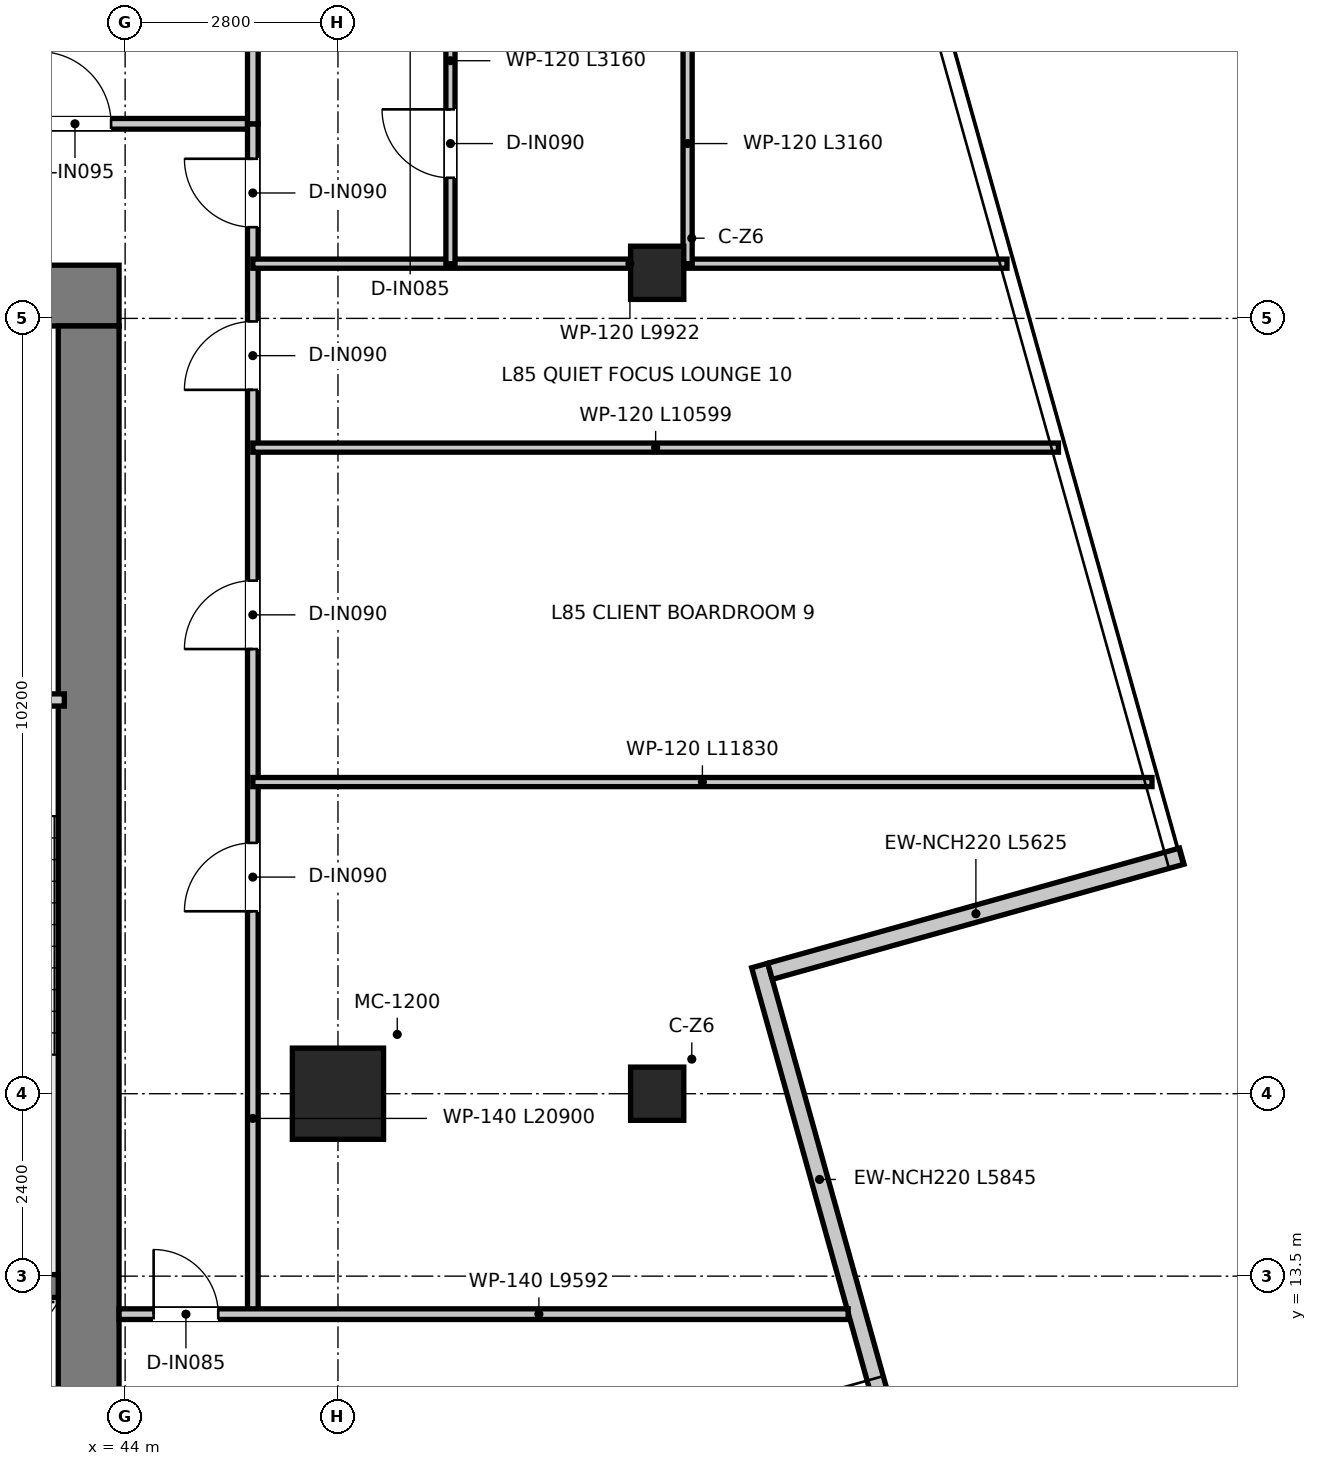
"""IFC4 building model, lengths in metres.
Left out: names, types, materials, properties, quantities, classifications, styles, units other than length and angle.
Written with IfcOpenShell. Run it as: python <this file> out.ifc"""

import sys

from ifc_helpers import new_model, si_unit, direction, frame, frame_2d, origin, origin_2d, place, context, subcontext, project, spatial, rectangle, extrude, source, transform, mapped, element, fill, save


model = new_model("IFC4")
c1 = context("Model", 3, precision=1e-05, world=origin(), true_north=direction((0.0, 1.0)))
c2 = subcontext(c1, "Body", "Model", "MODEL_VIEW")
j1 = project(units=[si_unit("LENGTHUNIT", "METRE"), si_unit("PLANEANGLEUNIT", "RADIAN")], contexts=[c1])
p1 = place(None, origin())
s1 = spatial("IfcSite", under=j1, at=p1, CompositionType="ELEMENT")
p2 = place(p1, origin())
s2 = spatial("IfcBuilding", under=s1, at=p2, CompositionType="ELEMENT")
p3 = place(p2, frame((0.0, 0.0, 347.45)))
s3 = spatial("IfcBuildingStorey", under=s2, at=p3, CompositionType="ELEMENT", Elevation=347.45)
p4 = place(p3, frame((28.08, 26.4, 0.0), z_axis=(0.0, 0.0, 1.0), x_axis=(1.0, 0.0, 0.0)))
e1 = element("IfcWall", 1, at=p4, inside=s3, PredefinedType="SHEAR", context=c2, shape_type="SweptSolid", body=[
    extrude(rectangle(XDim=15.84, YDim=0.8, at=frame_2d((7.92, 0.0))), origin(), (0.0, 0.0, 1.0), 3.95),
])
p5 = place(p4, frame((7.22, 0.0, 0.0)))
e2 = element("IfcOpeningElement", 2, at=p5, cuts=e1, PredefinedType="OPENING", context=c2, shape_type="SweptSolid", body=[
    extrude(rectangle(XDim=1.4, YDim=2.2, at=frame_2d((0.7, 1.1))), frame((0.0, 0.41, 0.0), z_axis=(0.0, -1.0, 0.0), x_axis=(1.0, 0.0, 0.0)), (0.0, 0.0, 1.0), 0.82),
])
p6 = place(p4, frame((1.775, 0.0, 0.0)))
e3 = element("IfcOpeningElement", 3, at=p6, cuts=e1, PredefinedType="OPENING", context=c2, shape_type="SweptSolid", body=[
    extrude(rectangle(XDim=1.05, YDim=2.1, at=frame_2d((0.525, 1.05))), frame((0.0, 0.41, 0.0), z_axis=(0.0, -1.0, 0.0), x_axis=(1.0, 0.0, 0.0)), (0.0, 0.0, 1.0), 0.82),
])
p7 = place(p4, frame((13.015, 0.0, 0.0)))
e4 = element("IfcOpeningElement", 4, at=p7, cuts=e1, PredefinedType="OPENING", context=c2, shape_type="SweptSolid", body=[
    extrude(rectangle(XDim=1.05, YDim=2.1, at=frame_2d((0.525, 1.05))), frame((0.0, 0.41, 0.0), z_axis=(0.0, -1.0, 0.0), x_axis=(1.0, 0.0, 0.0)), (0.0, 0.0, 1.0), 0.82),
])
p8 = place(p3, frame((43.52, 11.3, 0.0), z_axis=(0.0, 0.0, 1.0), x_axis=(0.0, 1.0, 0.0)))
e5 = element("IfcWall", 5, at=p8, inside=s3, PredefinedType="SHEAR", context=c2, shape_type="SweptSolid", body=[
    extrude(rectangle(XDim=14.7, YDim=0.8, at=frame_2d((7.35, 0.0))), origin(), (0.0, 0.0, 1.0), 3.95),
])
p9 = place(p3, frame((40.02, 13.37, 0.0), z_axis=(0.0, 0.0, 1.0), x_axis=(1.0, 0.0, 0.0)))
e6 = element("IfcWall", 6, at=p9, inside=s3, PredefinedType="SHEAR", context=c2, shape_type="SweptSolid", body=[
    extrude(rectangle(XDim=3.1, YDim=0.3, at=frame_2d((1.55, 0.0))), origin(), (0.0, 0.0, 1.0), 3.95),
])
m1 = source(origin(), c2, "Body", "SweptSolid", [
    extrude(rectangle(XDim=1.2, YDim=1.2, at=origin_2d()), origin(), (0.0, 0.0, 1.0), 3.95),
])
p10 = place(p3, frame((46.8, 15.9, 0.0), z_axis=(0.0, 0.0, 1.0), x_axis=(1.0, 0.0, 0.0)))
e7 = element("IfcColumn", 7, at=p10, inside=s3, PredefinedType="USERDEFINED", context=c2, shape_type="MappedRepresentation", body=[
    mapped(m1, transform((0.0, 0.0, 0.0), x_axis=(1.0, 0.0, 0.0), y_axis=(0.0, 1.0, 0.0), z_axis=(0.0, 0.0, 1.0), scale=1.0)),
])
m2 = source(origin(), c2, "Body", "SweptSolid", [
    extrude(rectangle(XDim=0.7, YDim=0.7, at=origin_2d()), origin(), (0.0, 0.0, 1.0), 3.95),
])
for number, where, z_axis, x_axis in (
    (8, (51.0, 26.7, 0.0), (0.0, 0.0, 1.0), (1.0, 0.0, 0.0)),
    (9, (51.0, 15.9, 0.0), (0.0, 0.0, 1.0), (1.0, 0.0, 0.0)),
):
    element("IfcColumn", number, at=place(p3, frame(where, z_axis=z_axis, x_axis=x_axis)), inside=s3, PredefinedType="COLUMN", context=c2, shape_type="MappedRepresentation", body=[
        mapped(m2, transform((0.0, 0.0, 0.0), x_axis=(1.0, 0.0, 0.0), y_axis=(0.0, 1.0, 0.0), z_axis=(0.0, 0.0, 1.0), scale=1.0)),
    ])
p11 = place(p3, frame((53.923, 11.958, 0.0), z_axis=(0.0, 0.0, 1.0), x_axis=(-0.26932160756, 0.96305029552, 0.0)))
e10 = element("IfcWall", 10, at=p11, inside=s3, PredefinedType="ELEMENTEDWALL", context=c2, shape_type="SweptSolid", body=[
    extrude(rectangle(XDim=5.845, YDim=0.22, at=frame_2d((2.923, 0.0))), origin(), (0.0, 0.0, 1.0), 3.67),
])
p12 = place(p3, frame((52.484, 17.51, 0.0), z_axis=(0.0, 0.0, 1.0), x_axis=(0.963038811961, 0.269362667524, 0.0)))
e11 = element("IfcWall", 11, at=p12, inside=s3, PredefinedType="ELEMENTEDWALL", context=c2, shape_type="SweptSolid", body=[
    extrude(rectangle(XDim=5.625, YDim=0.22, at=frame_2d((2.812, 0.0))), origin(), (0.0, 0.0, 1.0), 3.67),
])
p13 = place(p3, frame((40.04, 21.08, 0.0), z_axis=(0.0, 0.0, 1.0), x_axis=(1.0, 0.0, 0.0)))
e12 = element("IfcWall", 12, at=p13, inside=s3, PredefinedType="PARTITIONING", context=c2, shape_type="SweptSolid", body=[
    extrude(rectangle(XDim=3.16, YDim=0.16, at=frame_2d((1.58, 0.0))), origin(), (0.0, 0.0, 1.0), 3.67),
])
p14 = place(p13, frame((1.055, 0.0, 0.0)))
e13 = element("IfcOpeningElement", 13, at=p14, cuts=e12, PredefinedType="OPENING", context=c2, shape_type="SweptSolid", body=[
    extrude(rectangle(XDim=1.05, YDim=2.1, at=frame_2d((0.525, 1.05))), frame((0.0, 0.09, 0.0), z_axis=(0.0, -1.0, 0.0), x_axis=(1.0, 0.0, 0.0)), (0.0, 0.0, 1.0), 0.18),
])
p15 = place(p3, frame((26.32, 28.66, 0.0), z_axis=(0.0, 0.0, 1.0), x_axis=(1.0, 0.0, 0.0)))
e14 = element("IfcWall", 14, at=p15, inside=s3, PredefinedType="PARTITIONING", context=c2, shape_type="SweptSolid", body=[
    extrude(rectangle(XDim=19.36, YDim=0.14, at=frame_2d((9.68, 0.0))), origin(), (0.0, 0.0, 1.0), 3.18),
])
p16 = place(p15, frame((1.115, 0.0, 0.0)))
e15 = element("IfcOpeningElement", 15, at=p16, cuts=e14, PredefinedType="OPENING", context=c2, shape_type="SweptSolid", body=[
    extrude(rectangle(XDim=0.95, YDim=2.1, at=frame_2d((0.475, 1.05))), frame((0.0, 0.08, 0.0), z_axis=(0.0, -1.0, 0.0), x_axis=(1.0, 0.0, 0.0)), (0.0, 0.0, 1.0), 0.16),
])
p17 = place(p15, frame((5.455, 0.0, 0.0)))
e16 = element("IfcOpeningElement", 16, at=p17, cuts=e14, PredefinedType="OPENING", context=c2, shape_type="SweptSolid", body=[
    extrude(rectangle(XDim=0.95, YDim=2.1, at=frame_2d((0.475, 1.05))), frame((0.0, 0.08, 0.0), z_axis=(0.0, -1.0, 0.0), x_axis=(1.0, 0.0, 0.0)), (0.0, 0.0, 1.0), 0.16),
])
p18 = place(p15, frame((11.205, 0.0, 0.0)))
e17 = element("IfcOpeningElement", 17, at=p18, cuts=e14, PredefinedType="OPENING", context=c2, shape_type="SweptSolid", body=[
    extrude(rectangle(XDim=0.95, YDim=2.1, at=frame_2d((0.475, 1.05))), frame((0.0, 0.08, 0.0), z_axis=(0.0, -1.0, 0.0), x_axis=(1.0, 0.0, 0.0)), (0.0, 0.0, 1.0), 0.16),
])
p19 = place(p15, frame((16.545, 0.0, 0.0)))
e18 = element("IfcOpeningElement", 18, at=p19, cuts=e14, PredefinedType="OPENING", context=c2, shape_type="SweptSolid", body=[
    extrude(rectangle(XDim=0.95, YDim=2.1, at=frame_2d((0.475, 1.05))), frame((0.0, 0.08, 0.0), z_axis=(0.0, -1.0, 0.0), x_axis=(1.0, 0.0, 0.0)), (0.0, 0.0, 1.0), 0.16),
])
p20 = place(p3, frame((45.68, 13.0, 0.0), z_axis=(0.0, 0.0, 1.0), x_axis=(0.0, 1.0, 0.0)))
e19 = element("IfcWall", 19, at=p20, inside=s3, PredefinedType="PARTITIONING", context=c2, shape_type="SweptSolid", body=[
    extrude(rectangle(XDim=15.66, YDim=0.14, at=frame_2d((7.83, 0.0))), origin(), (0.0, 0.0, 1.0), 3.13),
])
p21 = place(p20, frame((14.3, 0.0, 0.0)))
e20 = element("IfcOpeningElement", 20, at=p21, cuts=e19, PredefinedType="OPENING", context=c2, shape_type="SweptSolid", body=[
    extrude(rectangle(XDim=0.9, YDim=2.1, at=frame_2d((0.45, 1.05))), frame((0.0, 0.08, 0.0), z_axis=(0.0, -1.0, 0.0), x_axis=(1.0, 0.0, 0.0)), (0.0, 0.0, 1.0), 0.16),
])
p22 = place(p20, frame((5.3, 0.0, 0.0)))
e21 = element("IfcOpeningElement", 21, at=p22, cuts=e19, PredefinedType="OPENING", context=c2, shape_type="SweptSolid", body=[
    extrude(rectangle(XDim=0.9, YDim=2.1, at=frame_2d((0.45, 1.05))), frame((0.0, 0.08, 0.0), z_axis=(0.0, -1.0, 0.0), x_axis=(1.0, 0.0, 0.0)), (0.0, 0.0, 1.0), 0.16),
])
p23 = place(p20, frame((8.75, 0.0, 0.0)))
e22 = element("IfcOpeningElement", 22, at=p23, cuts=e19, PredefinedType="OPENING", context=c2, shape_type="SweptSolid", body=[
    extrude(rectangle(XDim=0.9, YDim=2.1, at=frame_2d((0.45, 1.05))), frame((0.0, 0.08, 0.0), z_axis=(0.0, -1.0, 0.0), x_axis=(1.0, 0.0, 0.0)), (0.0, 0.0, 1.0), 0.16),
])
p24 = place(p20, frame((12.16, 0.0, 0.0)))
e23 = element("IfcOpeningElement", 23, at=p24, cuts=e19, PredefinedType="OPENING", context=c2, shape_type="SweptSolid", body=[
    extrude(rectangle(XDim=0.9, YDim=2.1, at=frame_2d((0.45, 1.05))), frame((0.0, 0.08, 0.0), z_axis=(0.0, -1.0, 0.0), x_axis=(1.0, 0.0, 0.0)), (0.0, 0.0, 1.0), 0.16),
])
p25 = place(p3, frame((43.92, 13.0, 0.0), z_axis=(0.0, 0.0, 1.0), x_axis=(1.0, 0.0, 0.0)))
e24 = element("IfcWall", 24, at=p25, inside=s3, PredefinedType="PARTITIONING", context=c2, shape_type="SweptSolid", body=[
    extrude(rectangle(XDim=9.592, YDim=0.14, at=frame_2d((4.796, 0.0))), origin(), (0.0, 0.0, 1.0), 3.18),
])
p26 = place(p25, frame((0.455, 0.0, 0.0)))
e25 = element("IfcOpeningElement", 25, at=p26, cuts=e24, PredefinedType="OPENING", context=c2, shape_type="SweptSolid", body=[
    extrude(rectangle(XDim=0.85, YDim=2.1, at=frame_2d((0.425, 1.05))), frame((0.0, 0.08, 0.0), z_axis=(0.0, -1.0, 0.0), x_axis=(1.0, 0.0, 0.0)), (0.0, 0.0, 1.0), 0.16),
])
p27 = place(p3, frame((45.68, 26.82, 0.0), z_axis=(0.0, 0.0, 1.0), x_axis=(1.0, 0.0, 0.0)))
e26 = element("IfcWall", 26, at=p27, inside=s3, PredefinedType="PARTITIONING", context=c2, shape_type="SweptSolid", body=[
    extrude(rectangle(XDim=9.922, YDim=0.12, at=frame_2d((4.961, 0.0))), origin(), (0.0, 0.0, 1.0), 3.13),
])
p28 = place(p3, frame((51.4, 26.82, 0.0), z_axis=(0.0, 0.0, 1.0), x_axis=(0.0, 1.0, 0.0)))
e27 = element("IfcWall", 27, at=p28, inside=s3, PredefinedType="PARTITIONING", context=c2, shape_type="SweptSolid", body=[
    extrude(rectangle(XDim=3.16, YDim=0.12, at=frame_2d((1.58, 0.0))), origin(), (0.0, 0.0, 1.0), 3.67),
])
p29 = place(p3, frame((48.28, 26.82, 0.0), z_axis=(0.0, 0.0, 1.0), x_axis=(0.0, 1.0, 0.0)))
e28 = element("IfcWall", 28, at=p29, inside=s3, PredefinedType="PARTITIONING", context=c2, shape_type="SweptSolid", body=[
    extrude(rectangle(XDim=3.16, YDim=0.12, at=frame_2d((1.58, 0.0))), origin(), (0.0, 0.0, 1.0), 3.18),
])
p30 = place(p29, frame((1.13, 0.0, 0.0)))
e29 = element("IfcOpeningElement", 29, at=p30, cuts=e28, PredefinedType="OPENING", context=c2, shape_type="SweptSolid", body=[
    extrude(rectangle(XDim=0.9, YDim=2.1, at=frame_2d((0.45, 1.05))), frame((0.0, 0.07, 0.0), z_axis=(0.0, -1.0, 0.0), x_axis=(1.0, 0.0, 0.0)), (0.0, 0.0, 1.0), 0.14),
])
p31 = place(p3, frame((45.68, 28.66, 0.0), z_axis=(0.0, 0.0, 1.0), x_axis=(0.0, 1.0, 0.0)))
e30 = element("IfcWall", 30, at=p31, inside=s3, PredefinedType="PARTITIONING", context=c2, shape_type="SweptSolid", body=[
    extrude(rectangle(XDim=5.24, YDim=0.14, at=frame_2d((2.62, 0.0))), origin(), (0.0, 0.0, 1.0), 3.43),
])
p32 = place(p3, frame((45.68, 20.0, 0.0), z_axis=(0.0, 0.0, 1.0), x_axis=(1.0, 0.0, 0.0)))
e31 = element("IfcWall", 31, at=p32, inside=s3, PredefinedType="PARTITIONING", context=c2, shape_type="SweptSolid", body=[
    extrude(rectangle(XDim=11.83, YDim=0.12, at=frame_2d((5.915, 0.0))), origin(), (0.0, 0.0, 1.0), 3.13),
])
p33 = place(p3, frame((45.68, 24.4, 0.0), z_axis=(0.0, 0.0, 1.0), x_axis=(1.0, 0.0, 0.0)))
e32 = element("IfcWall", 32, at=p33, inside=s3, PredefinedType="PARTITIONING", context=c2, shape_type="SweptSolid", body=[
    extrude(rectangle(XDim=10.599, YDim=0.12, at=frame_2d((5.299, 0.0))), origin(), (0.0, 0.0, 1.0), 3.13),
])
p34 = place(p21, origin())
e33 = element("IfcDoor", 33, at=p34, inside=s3, OperationType="SINGLE_SWING_RIGHT", PredefinedType="DOOR", context=c2, shape_type="SweptSolid", body=[
    extrude(rectangle(XDim=0.9, YDim=2.1, at=frame_2d((0.45, 1.05))), frame((0.0, 0.025, 0.0), z_axis=(0.0, -1.0, 0.0), x_axis=(1.0, 0.0, 0.0)), (0.0, 0.0, 1.0), 0.05),
])
fill(e20, e33)
p35 = place(p30, origin())
e34 = element("IfcDoor", 34, at=p35, inside=s3, OperationType="SINGLE_SWING_RIGHT", PredefinedType="DOOR", context=c2, shape_type="SweptSolid", body=[
    extrude(rectangle(XDim=0.9, YDim=2.1, at=frame_2d((0.45, 1.05))), frame((0.0, 0.025, 0.0), z_axis=(0.0, -1.0, 0.0), x_axis=(1.0, 0.0, 0.0)), (0.0, 0.0, 1.0), 0.05),
])
fill(e29, e34)
p36 = place(p19, origin())
e35 = element("IfcDoor", 35, at=p36, inside=s3, OperationType="SINGLE_SWING_LEFT", PredefinedType="DOOR", context=c2, shape_type="SweptSolid", body=[
    extrude(rectangle(XDim=0.95, YDim=2.1, at=frame_2d((0.475, 1.05))), frame((0.0, 0.025, 0.0), z_axis=(0.0, -1.0, 0.0), x_axis=(1.0, 0.0, 0.0)), (0.0, 0.0, 1.0), 0.05),
])
fill(e18, e35)
p37 = place(p22, origin())
e36 = element("IfcDoor", 36, at=p37, inside=s3, OperationType="SINGLE_SWING_LEFT", PredefinedType="DOOR", context=c2, shape_type="SweptSolid", body=[
    extrude(rectangle(XDim=0.9, YDim=2.1, at=frame_2d((0.45, 1.05))), frame((0.0, 0.025, 0.0), z_axis=(0.0, -1.0, 0.0), x_axis=(1.0, 0.0, 0.0)), (0.0, 0.0, 1.0), 0.05),
])
fill(e21, e36)
p38 = place(p23, origin())
e37 = element("IfcDoor", 37, at=p38, inside=s3, OperationType="SINGLE_SWING_LEFT", PredefinedType="DOOR", context=c2, shape_type="SweptSolid", body=[
    extrude(rectangle(XDim=0.9, YDim=2.1, at=frame_2d((0.45, 1.05))), frame((0.0, 0.025, 0.0), z_axis=(0.0, -1.0, 0.0), x_axis=(1.0, 0.0, 0.0)), (0.0, 0.0, 1.0), 0.05),
])
fill(e22, e37)
p39 = place(p24, origin())
e38 = element("IfcDoor", 38, at=p39, inside=s3, OperationType="SINGLE_SWING_LEFT", PredefinedType="DOOR", context=c2, shape_type="SweptSolid", body=[
    extrude(rectangle(XDim=0.9, YDim=2.1, at=frame_2d((0.45, 1.05))), frame((0.0, 0.025, 0.0), z_axis=(0.0, -1.0, 0.0), x_axis=(1.0, 0.0, 0.0)), (0.0, 0.0, 1.0), 0.05),
])
fill(e23, e38)
p40 = place(p26, origin())
e39 = element("IfcDoor", 39, at=p40, inside=s3, OperationType="SINGLE_SWING_LEFT", PredefinedType="DOOR", context=c2, shape_type="SweptSolid", body=[
    extrude(rectangle(XDim=0.85, YDim=2.1, at=frame_2d((0.425, 1.05))), frame((0.0, 0.025, 0.0), z_axis=(0.0, -1.0, 0.0), x_axis=(1.0, 0.0, 0.0)), (0.0, 0.0, 1.0), 0.05),
])
fill(e25, e39)
save(model, sys.argv[1])
